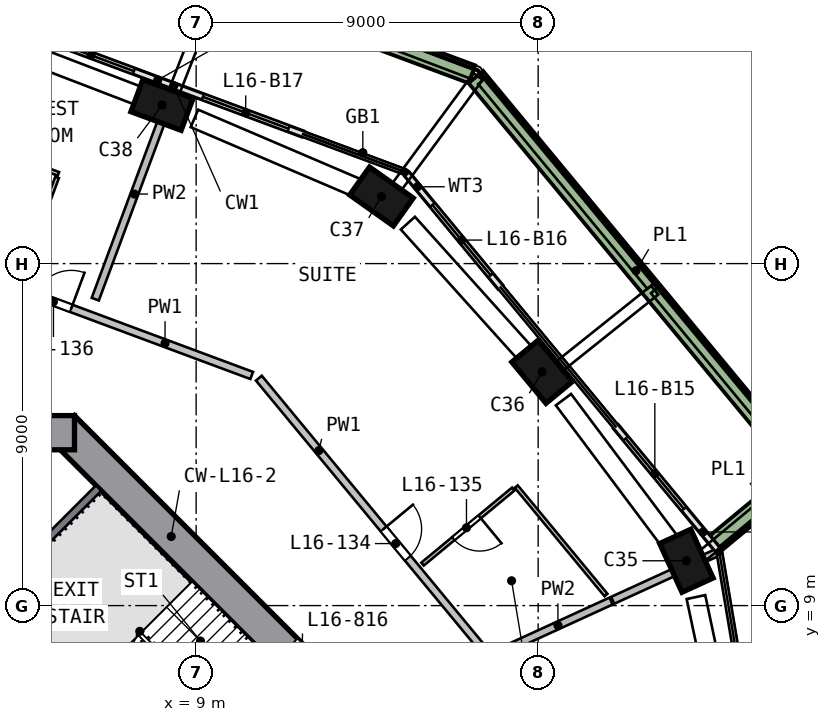
"""IFC4 building model, lengths in metres.
Left out: names, types, materials, properties, quantities, classifications, styles, units other than length and angle.
Written with IfcOpenShell. Run it as: python <this file> out.ifc"""

import sys

from ifc_helpers import new_model, si_unit, direction, frame, frame_2d, origin, origin_2d, place, context, subcontext, project, spatial, rectangle, extrude, element, fill, save


model = new_model("IFC4")
c1 = context("Model", 3, precision=1e-05, world=origin(), true_north=direction((0.0, 1.0)))
c2 = subcontext(c1, "Body", "Model", "MODEL_VIEW")
j1 = project(units=[si_unit("LENGTHUNIT", "METRE"), si_unit("PLANEANGLEUNIT", "RADIAN")], contexts=[c1])
p1 = place(None, origin())
s1 = spatial("IfcSite", under=j1, at=p1, CompositionType="ELEMENT")
p2 = place(p1, origin())
s2 = spatial("IfcBuilding", under=s1, at=p2, CompositionType="ELEMENT")
p3 = place(p2, frame((0.0, 0.0, 71.5)))
s3 = spatial("IfcBuildingStorey", under=s2, at=p3, CompositionType="ELEMENT", Elevation=71.5)
p4 = place(p3, frame((21.959, 10.054, 0.0), z_axis=(-0.048666634, 0.104043119, 0.993381391), x_axis=(0.413236233, -0.903351173, 0.114858494)))
e1 = element("IfcColumn", 1, at=p4, inside=s3, PredefinedType="COLUMN", context=c2, shape_type="SweptSolid", body=[
    extrude(rectangle(XDim=1.4, YDim=0.9, at=origin_2d()), origin(), (0.0, 0.0, 1.0), 3.02),
])
p5 = place(p3, frame((18.19, 15.049, 0.0), z_axis=(-0.072294041, 0.085879498, 0.993679165), x_axis=(-0.633458898, 0.765590624, -0.112253377)))
e2 = element("IfcColumn", 2, at=p5, inside=s3, PredefinedType="COLUMN", context=c2, shape_type="SweptSolid", body=[
    extrude(rectangle(XDim=1.4, YDim=0.9, at=origin_2d()), origin(), (0.0, 0.0, 1.0), 3.019),
])
p6 = place(p3, frame((13.99, 19.686, 0.0), z_axis=(-0.094180123, 0.065804824, 0.993377989), x_axis=(0.809440036, -0.575853797, 0.11488791)))
e3 = element("IfcColumn", 3, at=p6, inside=s3, PredefinedType="COLUMN", context=c2, shape_type="SweptSolid", body=[
    extrude(rectangle(XDim=1.4, YDim=0.9, at=origin_2d()), origin(), (0.0, 0.0, 1.0), 3.02),
])
p7 = place(p3, frame((8.229, 22.128, 0.0), z_axis=(-0.105609969, 0.038249246, 0.993671741), x_axis=(-0.931379606, 0.346289556, -0.112319069)))
e4 = element("IfcColumn", 4, at=p7, inside=s3, PredefinedType="COLUMN", context=c2, shape_type="SweptSolid", body=[
    extrude(rectangle(XDim=1.4, YDim=0.9, at=origin_2d()), origin(), (0.0, 0.0, 1.0), 3.019),
])
p8 = place(p3, frame((13.682, 5.481, 0.0), z_axis=(0.0, 0.0, 1.0), x_axis=(-0.707106781, 0.707106781, 0.0)))
e5 = element("IfcWall", 5, at=p8, inside=s3, PredefinedType="SHEAR", context=c2, shape_type="SweptSolid", body=[
    extrude(rectangle(XDim=11.598, YDim=0.9, at=frame_2d((5.799, 0.0))), origin(), (0.0, 0.0, 1.0), 3.5),
])
p9 = place(p8, frame((2.099, 0.0, 0.0)))
e6 = element("IfcOpeningElement", 6, at=p9, cuts=e5, PredefinedType="OPENING", context=c2, shape_type="SweptSolid", body=[
    extrude(rectangle(XDim=1.2, YDim=2.1, at=frame_2d((0.6, 1.05))), frame((0.0, 0.46, 0.0), z_axis=(0.0, -1.0, 0.0), x_axis=(1.0, 0.0, 0.0)), (0.0, 0.0, 1.0), 0.92),
])
p10 = place(p3, frame((5.799, 13.55, 0.0), z_axis=(0.0, 0.0, 1.0), x_axis=(-1.0, 0.0, 0.0)))
e7 = element("IfcWall", 7, at=p10, inside=s3, PredefinedType="SHEAR", context=c2, shape_type="SweptSolid", body=[
    extrude(rectangle(XDim=11.598, YDim=0.9, at=frame_2d((5.799, 0.0))), origin(), (0.0, 0.0, 1.0), 3.5),
])
p11 = place(p10, frame((4.899, 0.0, 0.0)))
e8 = element("IfcOpeningElement", 8, at=p11, cuts=e7, PredefinedType="OPENING", context=c2, shape_type="SweptSolid", body=[
    extrude(rectangle(XDim=1.8, YDim=2.1, at=frame_2d((0.9, 1.05))), frame((0.0, 0.46, 0.0), z_axis=(0.0, -1.0, 0.0), x_axis=(1.0, 0.0, 0.0)), (0.0, 0.0, 1.0), 0.92),
])
p12 = place(p3, frame((22.713, 10.484, 0.0), z_axis=(0.0, 0.0, 1.0), x_axis=(-0.63739785, 0.770534867, 0.0)))
e9 = element("IfcWall", 9, at=p12, inside=s3, PredefinedType="SOLIDWALL", context=c2, shape_type="SweptSolid", body=[
    extrude(rectangle(XDim=4.177, YDim=0.15, at=frame_2d((2.089, 0.0))), origin(), (0.0, 0.0, 1.0), 2.935),
])
p13 = place(p12, frame((1.377, 0.0, 0.0)))
e10 = element("IfcOpeningElement", 10, at=p13, cuts=e9, PredefinedType="OPENING", context=c2, shape_type="SweptSolid", body=[
    extrude(rectangle(XDim=2.4, YDim=2.4, at=frame_2d((1.2, 1.2))), frame((0.0, 0.085, 0.0), z_axis=(0.0, -1.0, 0.0), x_axis=(1.0, 0.0, 0.0)), (0.0, 0.0, 1.0), 0.17),
])
p14 = place(p3, frame((17.003, 17.386, 0.0), z_axis=(0.0, 0.0, 1.0), x_axis=(-0.637429835, 0.770508407, 0.0)))
e11 = element("IfcWall", 11, at=p14, inside=s3, PredefinedType="SOLIDWALL", context=c2, shape_type="SweptSolid", body=[
    extrude(rectangle(XDim=3.842, YDim=0.15, at=frame_2d((1.921, 0.0))), origin(), (0.0, 0.0, 1.0), 2.935),
])
p15 = place(p14, frame((0.4, 0.0, 0.0)))
e12 = element("IfcOpeningElement", 12, at=p15, cuts=e11, PredefinedType="OPENING", context=c2, shape_type="SweptSolid", body=[
    extrude(rectangle(XDim=2.4, YDim=2.4, at=frame_2d((1.2, 1.2))), frame((0.0, 0.085, 0.0), z_axis=(0.0, -1.0, 0.0), x_axis=(1.0, 0.0, 0.0)), (0.0, 0.0, 1.0), 0.17),
])
p16 = place(p3, frame((11.804, 21.412, 0.0), z_axis=(0.0, 0.0, 1.0), x_axis=(-0.937281631, 0.348573011, 0.0)))
e13 = element("IfcWall", 13, at=p16, inside=s3, PredefinedType="SOLIDWALL", context=c2, shape_type="SweptSolid", body=[
    extrude(rectangle(XDim=3.6, YDim=0.15, at=frame_2d((1.8, 0.0))), origin(), (0.0, 0.0, 1.0), 2.935),
])
p17 = place(p16, frame((0.4, 0.0, 0.0)))
e14 = element("IfcOpeningElement", 14, at=p17, cuts=e13, PredefinedType="OPENING", context=c2, shape_type="SweptSolid", body=[
    extrude(rectangle(XDim=2.4, YDim=2.4, at=frame_2d((1.2, 1.2))), frame((0.0, 0.085, 0.0), z_axis=(0.0, -1.0, 0.0), x_axis=(1.0, 0.0, 0.0)), (0.0, 0.0, 1.0), 0.17),
])
p18 = place(p3, frame((8.43, 22.667, 0.0), z_axis=(0.0, 0.0, 1.0), x_axis=(-0.937285903, 0.348561523, 0.0)))
e15 = element("IfcWall", 15, at=p18, inside=s3, PredefinedType="SOLIDWALL", context=c2, shape_type="SweptSolid", body=[
    extrude(rectangle(XDim=3.939, YDim=0.15, at=frame_2d((1.97, 0.0))), origin(), (0.0, 0.0, 1.0), 2.935),
])
p19 = place(p18, frame((1.139, 0.0, 0.0)))
e16 = element("IfcOpeningElement", 16, at=p19, cuts=e15, PredefinedType="OPENING", context=c2, shape_type="SweptSolid", body=[
    extrude(rectangle(XDim=2.4, YDim=2.4, at=frame_2d((1.2, 1.2))), frame((0.0, 0.085, 0.0), z_axis=(0.0, -1.0, 0.0), x_axis=(1.0, 0.0, 0.0)), (0.0, 0.0, 1.0), 0.17),
])
p20 = place(p3, frame((22.676, 10.648, 0.0), z_axis=(0.0, 0.0, 1.0), x_axis=(0.770480916, 0.637463064, 0.0)))
e17 = element("IfcWall", 17, at=p20, inside=s3, PredefinedType="SOLIDWALL", context=c2, shape_type="SweptSolid", body=[
    extrude(rectangle(XDim=3.199, YDim=0.5, at=frame_2d((1.6, 0.0))), origin(), (0.0, 0.0, 1.0), 0.7),
])
p21 = place(p3, frame((24.789, 12.72, 0.0), z_axis=(0.0, 0.0, 1.0), x_axis=(-0.637429031, 0.770509073, 0.0)))
e18 = element("IfcWall", 18, at=p21, inside=s3, PredefinedType="SOLIDWALL", context=c2, shape_type="SweptSolid", body=[
    extrude(rectangle(XDim=13.223, YDim=0.5, at=frame_2d((6.612, 0.0))), origin(), (0.0, 0.0, 1.0), 0.7),
])
p22 = place(p3, frame((16.254, 22.984, 0.0), z_axis=(0.0, 0.0, 1.0), x_axis=(-0.937278362, 0.348581802, 0.0)))
e19 = element("IfcWall", 19, at=p22, inside=s3, PredefinedType="SOLIDWALL", context=c2, shape_type="SweptSolid", body=[
    extrude(rectangle(XDim=13.723, YDim=0.5, at=frame_2d((6.862, 0.0))), origin(), (0.0, 0.0, 1.0), 0.7),
])
p23 = place(p3, frame((3.535, 9.334, 0.0), z_axis=(0.0, 0.0, 1.0), x_axis=(0.707106781, -0.707106781, 0.0)))
e20 = element("IfcWall", 20, at=p23, inside=s3, PredefinedType="SOLIDWALL", context=c2, shape_type="SweptSolid", body=[
    extrude(rectangle(XDim=8.2, YDim=0.2, at=frame_2d((4.1, 0.0))), origin(), (0.0, 0.0, 1.0), 3.0),
])
p24 = place(p23, frame((6.6, 0.0, 0.0)))
e21 = element("IfcOpeningElement", 21, at=p24, cuts=e20, PredefinedType="OPENING", context=c2, shape_type="SweptSolid", body=[
    extrude(rectangle(XDim=1.2, YDim=2.1, at=frame_2d((0.6, 1.05))), frame((0.0, 0.11, 0.0), z_axis=(0.0, -1.0, 0.0), x_axis=(1.0, 0.0, 0.0)), (0.0, 0.0, 1.0), 0.22),
])
p25 = place(p3, frame((3.677, 9.334, 0.0), z_axis=(0.0, 0.0, 1.0), x_axis=(0.707106781, 0.707106781, 0.0)))
e22 = element("IfcWall", 22, at=p25, inside=s3, PredefinedType="SOLIDWALL", context=c2, shape_type="SweptSolid", body=[
    extrude(rectangle(XDim=3.9, YDim=0.2, at=frame_2d((1.95, 0.0))), origin(), (0.0, 0.0, 1.0), 3.0),
])
p26 = place(p3, frame((1.73, 18.303, 0.0), z_axis=(0.0, 0.0, 1.0), x_axis=(0.937280999, -0.348574712, 0.0)))
e23 = element("IfcWall", 23, at=p26, inside=s3, PredefinedType="SOLIDWALL", context=c2, shape_type="SweptSolid", body=[
    extrude(rectangle(XDim=9.316, YDim=0.2, at=frame_2d((4.658, 0.0))), origin(), (0.0, 0.0, 1.0), 3.0),
])
p27 = place(p26, frame((3.25, 0.0, 0.0)))
e24 = element("IfcOpeningElement", 24, at=p27, cuts=e23, PredefinedType="OPENING", context=c2, shape_type="SweptSolid", body=[
    extrude(rectangle(XDim=1.0, YDim=2.1, at=frame_2d((0.5, 1.05))), frame((0.0, 0.11, 0.0), z_axis=(0.0, -1.0, 0.0), x_axis=(1.0, 0.0, 0.0)), (0.0, 0.0, 1.0), 0.22),
])
p28 = place(p3, frame((10.65, 14.986, 0.0), z_axis=(0.0, 0.0, 1.0), x_axis=(0.637416992, -0.770519032, 0.0)))
e25 = element("IfcWall", 25, at=p28, inside=s3, PredefinedType="SOLIDWALL", context=c2, shape_type="SweptSolid", body=[
    extrude(rectangle(XDim=9.316, YDim=0.2, at=frame_2d((4.658, 0.0))), origin(), (0.0, 0.0, 1.0), 3.0),
])
p29 = place(p28, frame((5.15, 0.0, 0.0)))
e26 = element("IfcOpeningElement", 26, at=p29, cuts=e25, PredefinedType="OPENING", context=c2, shape_type="SweptSolid", body=[
    extrude(rectangle(XDim=1.0, YDim=2.1, at=frame_2d((0.5, 1.05))), frame((0.0, 0.11, 0.0), z_axis=(0.0, -1.0, 0.0), x_axis=(1.0, 0.0, 0.0)), (0.0, 0.0, 1.0), 0.22),
])
p30 = place(p3, frame((6.346, 17.064, 0.0), z_axis=(0.0, 0.0, 1.0), x_axis=(0.348588385, 0.937275913, 0.0)))
e27 = element("IfcWall", 27, at=p30, inside=s3, PredefinedType="SOLIDWALL", context=c2, shape_type="SweptSolid", body=[
    extrude(rectangle(XDim=5.903, YDim=0.2, at=frame_2d((2.951, 0.0))), origin(), (0.0, 0.0, 1.0), 3.0),
])
p31 = place(p3, frame((17.123, 7.839, 0.0), z_axis=(0.0, 0.0, 1.0), x_axis=(0.909226405, 0.416301986, 0.0)))
e28 = element("IfcWall", 28, at=p31, inside=s3, PredefinedType="SOLIDWALL", context=c2, shape_type="SweptSolid", body=[
    extrude(rectangle(XDim=3.075, YDim=0.2, at=frame_2d((1.537, 0.0))), origin(), (0.0, 0.0, 1.0), 3.0),
])
p32 = place(p3, frame((19.96, 9.138, 0.0), z_axis=(0.0, 0.0, 1.0), x_axis=(0.90922469, 0.416305732, 0.0)))
e29 = element("IfcWall", 29, at=p32, inside=s3, PredefinedType="SOLIDWALL", context=c2, shape_type="SweptSolid", body=[
    extrude(rectangle(XDim=3.011, YDim=0.2, at=frame_2d((1.506, 0.0))), origin(), (0.0, 0.0, 1.0), 3.0),
])
p33 = place(p3, frame((2.236, 21.529, 0.0), z_axis=(0.0, 0.0, 1.0), x_axis=(0.937266155, -0.348614623, 0.0)))
e30 = element("IfcWall", 30, at=p33, inside=s3, PredefinedType="PARTITIONING", context=c2, shape_type="SweptSolid", body=[
    extrude(rectangle(XDim=3.35, YDim=0.1, at=frame_2d((1.675, 0.0))), origin(), (0.0, 0.0, 1.0), 3.0),
])
p34 = place(p3, frame((4.331, 17.55, 0.0), z_axis=(0.0, 0.0, 1.0), x_axis=(0.348547967, 0.937290945, 0.0)))
e31 = element("IfcWall", 31, at=p34, inside=s3, PredefinedType="PARTITIONING", context=c2, shape_type="SweptSolid", body=[
    extrude(rectangle(XDim=2.9, YDim=0.1, at=frame_2d((1.45, 0.0))), origin(), (0.0, 0.0, 1.0), 3.0),
])
p35 = place(p34, frame((0.95, 0.0, 0.0)))
e32 = element("IfcOpeningElement", 32, at=p35, cuts=e31, PredefinedType="OPENING", context=c2, shape_type="SweptSolid", body=[
    extrude(rectangle(XDim=0.9, YDim=2.1, at=frame_2d((0.45, 1.05))), frame((0.0, 0.06, 0.0), z_axis=(0.0, -1.0, 0.0), x_axis=(1.0, 0.0, 0.0)), (0.0, 0.0, 1.0), 0.12),
])
p36 = place(p3, frame((17.346, 12.068, 0.0), z_axis=(0.0, 0.0, 1.0), x_axis=(-0.770482353, -0.637461327, 0.0)))
e33 = element("IfcWall", 33, at=p36, inside=s3, PredefinedType="PARTITIONING", context=c2, shape_type="SweptSolid", body=[
    extrude(rectangle(XDim=3.1, YDim=0.1, at=frame_2d((1.55, 0.0))), origin(), (0.0, 0.0, 1.0), 3.0),
])
p37 = place(p36, frame((1.15, 0.0, 0.0)))
e34 = element("IfcOpeningElement", 34, at=p37, cuts=e33, PredefinedType="OPENING", context=c2, shape_type="SweptSolid", body=[
    extrude(rectangle(XDim=0.9, YDim=2.1, at=frame_2d((0.45, 1.05))), frame((0.0, 0.06, 0.0), z_axis=(0.0, -1.0, 0.0), x_axis=(1.0, 0.0, 0.0)), (0.0, 0.0, 1.0), 0.12),
])
p38 = place(p3, frame((17.424, 12.132, 0.0), z_axis=(0.0, 0.0, 1.0), x_axis=(0.637431462, -0.770507061, 0.0)))
e35 = element("IfcWall", 35, at=p38, inside=s3, PredefinedType="PARTITIONING", context=c2, shape_type="SweptSolid", body=[
    extrude(rectangle(XDim=3.704, YDim=0.1, at=frame_2d((1.852, 0.0))), origin(), (0.0, 0.0, 1.0), 3.0),
])
p39 = place(p13, origin())
e36 = element("IfcDoor", 36, at=p39, inside=s3, OperationType="SLIDING_TO_LEFT", PredefinedType="DOOR", context=c2, shape_type="SweptSolid", body=[
    extrude(rectangle(XDim=2.4, YDim=2.4, at=frame_2d((1.2, 1.2))), frame((0.0, 0.025, 0.0), z_axis=(0.0, -1.0, 0.0), x_axis=(1.0, 0.0, 0.0)), (0.0, 0.0, 1.0), 0.05),
])
fill(e10, e36)
p40 = place(p15, origin())
e37 = element("IfcDoor", 37, at=p40, inside=s3, OperationType="SLIDING_TO_RIGHT", PredefinedType="DOOR", context=c2, shape_type="SweptSolid", body=[
    extrude(rectangle(XDim=2.4, YDim=2.4, at=frame_2d((1.2, 1.2))), frame((0.0, 0.025, 0.0), z_axis=(0.0, -1.0, 0.0), x_axis=(1.0, 0.0, 0.0)), (0.0, 0.0, 1.0), 0.05),
])
fill(e12, e37)
p41 = place(p17, origin())
e38 = element("IfcDoor", 38, at=p41, inside=s3, OperationType="SLIDING_TO_RIGHT", PredefinedType="DOOR", context=c2, shape_type="SweptSolid", body=[
    extrude(rectangle(XDim=2.4, YDim=2.4, at=frame_2d((1.2, 1.2))), frame((0.0, 0.025, 0.0), z_axis=(0.0, -1.0, 0.0), x_axis=(1.0, 0.0, 0.0)), (0.0, 0.0, 1.0), 0.05),
])
fill(e14, e38)
p42 = place(p19, origin())
e39 = element("IfcDoor", 39, at=p42, inside=s3, OperationType="SLIDING_TO_LEFT", PredefinedType="DOOR", context=c2, shape_type="SweptSolid", body=[
    extrude(rectangle(XDim=2.4, YDim=2.4, at=frame_2d((1.2, 1.2))), frame((0.0, 0.025, 0.0), z_axis=(0.0, -1.0, 0.0), x_axis=(1.0, 0.0, 0.0)), (0.0, 0.0, 1.0), 0.05),
])
fill(e16, e39)
p43 = place(p29, origin())
e40 = element("IfcDoor", 40, at=p43, inside=s3, OperationType="SINGLE_SWING_LEFT", PredefinedType="DOOR", context=c2, shape_type="SweptSolid", body=[
    extrude(rectangle(XDim=1.0, YDim=2.1, at=frame_2d((0.5, 1.05))), frame((0.0, 0.025, 0.0), z_axis=(0.0, -1.0, 0.0), x_axis=(1.0, 0.0, 0.0)), (0.0, 0.0, 1.0), 0.05),
])
fill(e26, e40)
p44 = place(p37, origin())
e41 = element("IfcDoor", 41, at=p44, inside=s3, OperationType="SINGLE_SWING_LEFT", PredefinedType="DOOR", context=c2, shape_type="SweptSolid", body=[
    extrude(rectangle(XDim=0.9, YDim=2.1, at=frame_2d((0.45, 1.05))), frame((0.0, 0.025, 0.0), z_axis=(0.0, -1.0, 0.0), x_axis=(1.0, 0.0, 0.0)), (0.0, 0.0, 1.0), 0.05),
])
fill(e34, e41)
p45 = place(p27, origin())
e42 = element("IfcDoor", 42, at=p45, inside=s3, OperationType="SINGLE_SWING_RIGHT", PredefinedType="DOOR", context=c2, shape_type="SweptSolid", body=[
    extrude(rectangle(XDim=1.0, YDim=2.1, at=frame_2d((0.5, 1.05))), frame((0.0, 0.025, 0.0), z_axis=(0.0, -1.0, 0.0), x_axis=(1.0, 0.0, 0.0)), (0.0, 0.0, 1.0), 0.05),
])
fill(e24, e42)
save(model, sys.argv[1])
